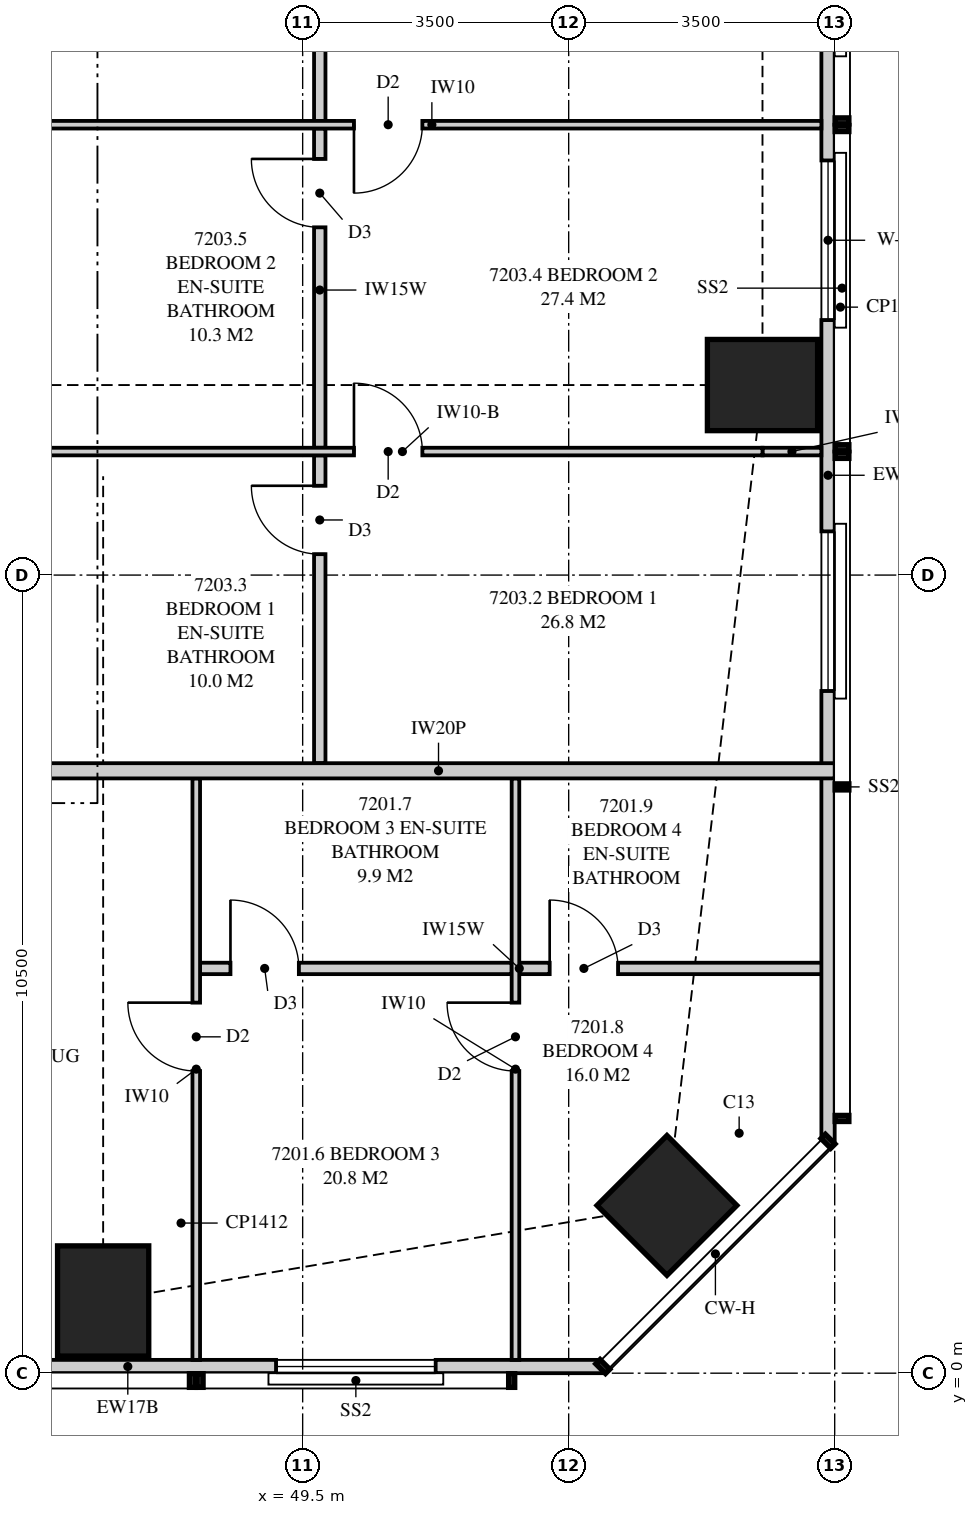
"""IFC4 building model, lengths in metres.
Left out: names, types, materials, properties, quantities, classifications, styles, units other than length and angle.
Written with IfcOpenShell. Run it as: python <this file> out.ifc"""

import sys

from ifc_helpers import new_model, si_unit, direction, frame, frame_2d, origin, origin_2d, place, context, subcontext, project, spatial, polyline, rectangle, outline, extrude, element, fill, save


model = new_model("IFC4")
c1 = context("Model", 3, precision=1e-05, world=origin(), true_north=direction((0.0, 1.0)))
c2 = subcontext(c1, "Body", "Model", "MODEL_VIEW")
j1 = project(units=[si_unit("LENGTHUNIT", "METRE"), si_unit("PLANEANGLEUNIT", "RADIAN")], contexts=[c1])
p1 = place(None, origin())
s1 = spatial("IfcSite", under=j1, at=p1, CompositionType="ELEMENT")
p2 = place(p1, origin())
s2 = spatial("IfcBuilding", under=s1, at=p2, CompositionType="ELEMENT")
p3 = place(p2, frame((0.0, 0.0, 263.85)))
s3 = spatial("IfcBuildingStorey", under=s2, at=p3, CompositionType="ELEMENT", Elevation=263.85)
p4 = place(p3, frame((46.875, 0.95, 0.0), z_axis=(0.0, 0.0, 1.0), x_axis=(0.0, 1.0, 0.0)))
e1 = element("IfcColumn", 1, at=p4, inside=s3, PredefinedType="COLUMN", context=c2, shape_type="SweptSolid", body=[
    extrude(rectangle(XDim=1.45, YDim=1.2, at=origin_2d()), origin(), (0.0, 0.0, 1.0), 3.9),
])
p5 = place(p3, frame((54.293, 2.207, 0.0), z_axis=(0.0, 0.0, 1.0), x_axis=(0.707106781187, 0.707106781187, 0.0)))
e2 = element("IfcColumn", 2, at=p5, inside=s3, PredefinedType="COLUMN", context=c2, shape_type="SweptSolid", body=[
    extrude(rectangle(XDim=1.3, YDim=1.3, at=origin_2d()), origin(), (0.0, 0.0, 1.0), 3.9),
])
p6 = place(p3, frame((55.55, 13.0, 0.0), z_axis=(0.0, 0.0, 1.0), x_axis=(1.0, 0.0, 0.0)))
e3 = element("IfcColumn", 3, at=p6, inside=s3, PredefinedType="COLUMN", context=c2, shape_type="SweptSolid", body=[
    extrude(rectangle(XDim=1.45, YDim=1.2, at=origin_2d()), origin(), (0.0, 0.0, 1.0), 3.9),
])
p7 = place(p3, frame((40.95, 0.087, 0.0), z_axis=(0.0, 0.0, 1.0), x_axis=(1.0, 0.0, 0.0)))
e4 = element("IfcWall", 4, at=p7, inside=s3, PredefinedType="SOLIDWALL", context=c2, shape_type="SweptSolid", body=[
    extrude(outline(polyline([(0.0, 0.0), (12.499, 0.0), (12.499, 3.62), (6.14, 3.62), (6.14, 2.7), (6.056, 2.7), (6.056, 3.62), (5.925, 3.62), (5.925, 2.7), (0.0, 2.7), (0.0, 0.0)])), frame((0.0, 0.087, 0.0), z_axis=(0.0, -1.0, 0.0), x_axis=(1.0, 0.0, 0.0)), (0.0, 0.0, 1.0), 0.175),
])
p8 = place(p7, frame((0.761, 0.0, 0.4)))
e5 = element("IfcOpeningElement", 5, at=p8, cuts=e4, PredefinedType="OPENING", context=c2, shape_type="SweptSolid", body=[
    extrude(rectangle(XDim=1.2, YDim=2.0, at=frame_2d((0.6, 1.0))), frame((0.0, 0.097, 0.0), z_axis=(0.0, -1.0, 0.0), x_axis=(1.0, 0.0, 0.0)), (0.0, 0.0, 1.0), 0.195),
])
p9 = place(p7, frame((2.944, 0.0, 0.4)))
e6 = element("IfcOpeningElement", 6, at=p9, cuts=e4, PredefinedType="OPENING", context=c2, shape_type="SweptSolid", body=[
    extrude(rectangle(XDim=2.1, YDim=2.25, at=frame_2d((1.05, 1.125))), frame((0.0, 0.097, 0.0), z_axis=(0.0, -1.0, 0.0), x_axis=(1.0, 0.0, 0.0)), (0.0, 0.0, 1.0), 0.195),
])
p10 = place(p7, frame((8.2, 0.0, 0.4)))
e7 = element("IfcOpeningElement", 7, at=p10, cuts=e4, PredefinedType="OPENING", context=c2, shape_type="SweptSolid", body=[
    extrude(rectangle(XDim=2.1, YDim=2.25, at=frame_2d((1.05, 1.125))), frame((0.0, 0.097, 0.0), z_axis=(0.0, -1.0, 0.0), x_axis=(1.0, 0.0, 0.0)), (0.0, 0.0, 1.0), 0.195),
])
p11 = place(p3, frame((56.413, 3.051, 0.0), z_axis=(0.0, 0.0, 1.0), x_axis=(0.0, 1.0, 0.0)))
e8 = element("IfcWall", 8, at=p11, inside=s3, PredefinedType="SOLIDWALL", context=c2, shape_type="SweptSolid", body=[
    extrude(outline(polyline([(0.0, 0.0), (17.524, 0.0), (17.524, 2.7), (9.949, 2.7), (9.949, 3.62), (9.858, 3.62), (9.858, 2.7), (9.688, 2.7), (9.688, 3.62), (0.0, 3.62), (0.0, 0.0)])), frame((0.0, 0.087, 0.0), z_axis=(0.0, -1.0, 0.0), x_axis=(1.0, 0.0, 0.0)), (0.0, 0.0, 1.0), 0.175),
])
p12 = place(p11, frame((5.924, 0.0, 0.4)))
e9 = element("IfcOpeningElement", 9, at=p12, cuts=e8, PredefinedType="OPENING", context=c2, shape_type="SweptSolid", body=[
    extrude(rectangle(XDim=2.1, YDim=2.25, at=frame_2d((1.05, 1.125))), frame((0.0, 0.097, 0.0), z_axis=(0.0, -1.0, 0.0), x_axis=(1.0, 0.0, 0.0)), (0.0, 0.0, 1.0), 0.195),
])
p13 = place(p11, frame((10.804, 0.0, 0.4)))
e10 = element("IfcOpeningElement", 10, at=p13, cuts=e8, PredefinedType="OPENING", context=c2, shape_type="SweptSolid", body=[
    extrude(rectangle(XDim=2.1, YDim=2.25, at=frame_2d((1.05, 1.125))), frame((0.0, 0.097, 0.0), z_axis=(0.0, -1.0, 0.0), x_axis=(1.0, 0.0, 0.0)), (0.0, 0.0, 1.0), 0.195),
])
p14 = place(p11, frame((14.374, 0.0, 0.4)))
e11 = element("IfcOpeningElement", 11, at=p14, cuts=e8, PredefinedType="OPENING", context=c2, shape_type="SweptSolid", body=[
    extrude(rectangle(XDim=2.1, YDim=2.25, at=frame_2d((1.05, 1.125))), frame((0.0, 0.097, 0.0), z_axis=(0.0, -1.0, 0.0), x_axis=(1.0, 0.0, 0.0)), (0.0, 0.0, 1.0), 0.195),
])
p15 = place(p3, frame((48.1, 0.175, 0.0), z_axis=(0.0, 0.0, 1.0), x_axis=(0.0, 1.0, 0.0)))
e12 = element("IfcWall", 12, at=p15, inside=s3, PredefinedType="PARTITIONING", context=c2, shape_type="SweptSolid", body=[
    extrude(outline(polyline([(0.0, 0.0), (7.65, 0.0), (7.65, 3.62), (7.65, 3.02), (1.855, 3.02), (1.855, 2.7), (0.11, 2.7), (0.11, 3.62), (0.0, 3.62), (0.0, 0.0)])), frame((0.0, 0.05, 0.0), z_axis=(0.0, -1.0, 0.0), x_axis=(1.0, 0.0, 0.0)), (0.0, 0.0, 1.0), 0.1),
])
p16 = place(p15, frame((3.8, 0.0, 0.0)))
e13 = element("IfcOpeningElement", 13, at=p16, cuts=e12, PredefinedType="OPENING", context=c2, shape_type="SweptSolid", body=[
    extrude(rectangle(XDim=0.9, YDim=2.1, at=frame_2d((0.45, 1.05))), frame((0.0, 0.06, 0.0), z_axis=(0.0, -1.0, 0.0), x_axis=(1.0, 0.0, 0.0)), (0.0, 0.0, 1.0), 0.12),
])
p17 = place(p3, frame((52.3, 0.175, 0.0), z_axis=(0.0, 0.0, 1.0), x_axis=(0.0, 1.0, 0.0)))
e14 = element("IfcWall", 14, at=p17, inside=s3, PredefinedType="PARTITIONING", context=c2, shape_type="SweptSolid", body=[
    extrude(outline(polyline([(0.0, 0.0), (7.65, 0.0), (7.65, 3.62), (2.567, 3.62), (2.567, 2.7), (0.822, 2.7), (0.822, 3.62), (0.0, 3.62), (0.0, 0.0)])), frame((0.0, 0.05, 0.0), z_axis=(0.0, -1.0, 0.0), x_axis=(1.0, 0.0, 0.0)), (0.0, 0.0, 1.0), 0.1),
])
p18 = place(p17, frame((3.8, 0.0, 0.0)))
e15 = element("IfcOpeningElement", 15, at=p18, cuts=e14, PredefinedType="OPENING", context=c2, shape_type="SweptSolid", body=[
    extrude(rectangle(XDim=0.9, YDim=2.1, at=frame_2d((0.45, 1.05))), frame((0.0, 0.06, 0.0), z_axis=(0.0, -1.0, 0.0), x_axis=(1.0, 0.0, 0.0)), (0.0, 0.0, 1.0), 0.12),
])
p19 = place(p3, frame((48.15, 5.325, 0.0), z_axis=(0.0, 0.0, 1.0), x_axis=(1.0, 0.0, 0.0)))
e16 = element("IfcWall", 16, at=p19, inside=s3, PredefinedType="PLUMBINGWALL", context=c2, shape_type="SweptSolid", body=[
    extrude(outline(polyline([(0.0, 0.0), (4.1, 0.0), (4.1, 3.62), (0.01, 3.62), (0.01, 3.02), (0.0, 3.02), (0.0, 3.62), (0.0, 0.0)])), frame((0.0, 0.075, 0.0), z_axis=(0.0, -1.0, 0.0), x_axis=(1.0, 0.0, 0.0)), (0.0, 0.0, 1.0), 0.15),
])
p20 = place(p19, frame((0.4, 0.0, 0.0)))
e17 = element("IfcOpeningElement", 17, at=p20, cuts=e16, PredefinedType="OPENING", context=c2, shape_type="SweptSolid", body=[
    extrude(rectangle(XDim=0.9, YDim=2.1, at=frame_2d((0.45, 1.05))), frame((0.0, 0.085, 0.0), z_axis=(0.0, -1.0, 0.0), x_axis=(1.0, 0.0, 0.0)), (0.0, 0.0, 1.0), 0.17),
])
p21 = place(p3, frame((52.35, 5.325, 0.0), z_axis=(0.0, 0.0, 1.0), x_axis=(1.0, 0.0, 0.0)))
e18 = element("IfcWall", 18, at=p21, inside=s3, PredefinedType="PLUMBINGWALL", context=c2, shape_type="SweptSolid", body=[
    extrude(outline(polyline([(0.0, 0.0), (4.15, 0.0), (4.15, 3.62), (3.197, 3.62), (3.197, 2.7), (1.415, 2.7), (1.415, 3.62), (0.0, 3.62), (0.0, 0.0)])), frame((0.0, 0.075, 0.0), z_axis=(0.0, -1.0, 0.0), x_axis=(1.0, 0.0, 0.0)), (0.0, 0.0, 1.0), 0.15),
])
p22 = place(p21, frame((0.4, 0.0, 0.0)))
e19 = element("IfcOpeningElement", 19, at=p22, cuts=e18, PredefinedType="OPENING", context=c2, shape_type="SweptSolid", body=[
    extrude(rectangle(XDim=0.9, YDim=2.1, at=frame_2d((0.45, 1.05))), frame((0.0, 0.085, 0.0), z_axis=(0.0, -1.0, 0.0), x_axis=(1.0, 0.0, 0.0)), (0.0, 0.0, 1.0), 0.17),
])
p23 = place(p3, frame((46.075, 7.925, 0.0), z_axis=(0.0, 0.0, 1.0), x_axis=(1.0, 0.0, 0.0)))
e20 = element("IfcWall", 20, at=p23, inside=s3, PredefinedType="PARTITIONING", context=c2, shape_type="SweptSolid", body=[
    extrude(outline(polyline([(0.0, 0.0), (10.425, 0.0), (10.425, 3.62), (9.8, 3.62), (9.8, 2.7), (7.968, 2.7), (7.968, 3.62), (2.11, 3.62), (2.11, 3.02), (0.0, 3.02), (0.0, 3.62), (0.0, 0.0)])), frame((0.0, 0.1, 0.0), z_axis=(0.0, -1.0, 0.0), x_axis=(1.0, 0.0, 0.0)), (0.0, 0.0, 1.0), 0.2),
])
p24 = place(p3, frame((56.325, 12.125, 0.0), z_axis=(0.0, 0.0, 1.0), x_axis=(-1.0, 0.0, 0.0)))
e21 = element("IfcWall", 21, at=p24, inside=s3, PredefinedType="PARTITIONING", context=c2, shape_type="SweptSolid", body=[
    extrude(outline(polyline([(0.0, 0.0), (0.775, 0.0), (0.775, 2.7), (0.011, 2.7), (0.011, 3.62), (0.0, 3.62), (0.0, 0.0)])), frame((0.0, 0.05, 0.0), z_axis=(0.0, -1.0, 0.0), x_axis=(1.0, 0.0, 0.0)), (0.0, 0.0, 1.0), 0.1),
])
p25 = place(p3, frame((55.55, 12.125, 0.0), z_axis=(0.0, 0.0, 1.0), x_axis=(-1.0, 0.0, 0.0)))
e22 = element("IfcWall", 22, at=p25, inside=s3, PredefinedType="PARTITIONING", context=c2, shape_type="SweptSolid", body=[
    extrude(outline(polyline([(0.0, 0.0), (9.475, 0.0), (9.475, 3.02), (0.968, 3.02), (0.968, 2.7), (0.0, 2.7), (0.0, 0.0)])), frame((0.0, 0.05, 0.0), z_axis=(0.0, -1.0, 0.0), x_axis=(1.0, 0.0, 0.0)), (0.0, 0.0, 1.0), 0.1),
])
p26 = place(p25, frame((4.475, 0.0, 0.0)))
e23 = element("IfcOpeningElement", 23, at=p26, cuts=e22, PredefinedType="OPENING", context=c2, shape_type="SweptSolid", body=[
    extrude(rectangle(XDim=0.9, YDim=2.1, at=frame_2d((0.45, 1.05))), frame((0.0, 0.06, 0.0), z_axis=(0.0, -1.0, 0.0), x_axis=(1.0, 0.0, 0.0)), (0.0, 0.0, 1.0), 0.12),
])
p27 = place(p3, frame((56.325, 16.425, 0.0), z_axis=(0.0, 0.0, 1.0), x_axis=(-1.0, 0.0, 0.0)))
e24 = element("IfcWall", 24, at=p27, inside=s3, PredefinedType="PARTITIONING", context=c2, shape_type="SweptSolid", body=[
    extrude(outline(polyline([(0.0, 0.0), (10.25, 0.0), (10.25, 3.62), (1.635, 3.62), (1.635, 2.7), (0.0, 2.7), (0.0, 3.62), (0.0, 0.0)])), frame((0.0, 0.05, 0.0), z_axis=(0.0, -1.0, 0.0), x_axis=(1.0, 0.0, 0.0)), (0.0, 0.0, 1.0), 0.1),
])
p28 = place(p27, frame((5.25, 0.0, 0.0)))
e25 = element("IfcOpeningElement", 25, at=p28, cuts=e24, PredefinedType="OPENING", context=c2, shape_type="SweptSolid", body=[
    extrude(rectangle(XDim=0.9, YDim=2.1, at=frame_2d((0.45, 1.05))), frame((0.0, 0.06, 0.0), z_axis=(0.0, -1.0, 0.0), x_axis=(1.0, 0.0, 0.0)), (0.0, 0.0, 1.0), 0.12),
])
p29 = place(p3, frame((49.725, 8.025, 0.0), z_axis=(0.0, 0.0, 1.0), x_axis=(0.0, 1.0, 0.0)))
e26 = element("IfcWall", 26, at=p29, inside=s3, PredefinedType="PLUMBINGWALL", context=c2, shape_type="SweptSolid", body=[
    extrude(outline(polyline([(0.0, 0.0), (4.05, 0.0), (4.05, 3.62), (4.05, 3.02), (3.69, 3.02), (3.69, 3.62), (0.0, 3.62), (0.0, 0.0)])), frame((0.0, 0.075, 0.0), z_axis=(0.0, -1.0, 0.0), x_axis=(1.0, 0.0, 0.0)), (0.0, 0.0, 1.0), 0.15),
])
p30 = place(p29, frame((2.75, 0.0, 0.0)))
e27 = element("IfcOpeningElement", 27, at=p30, cuts=e26, PredefinedType="OPENING", context=c2, shape_type="SweptSolid", body=[
    extrude(rectangle(XDim=0.9, YDim=2.1, at=frame_2d((0.45, 1.05))), frame((0.0, 0.085, 0.0), z_axis=(0.0, -1.0, 0.0), x_axis=(1.0, 0.0, 0.0)), (0.0, 0.0, 1.0), 0.17),
])
p31 = place(p3, frame((49.725, 12.175, 0.0), z_axis=(0.0, 0.0, 1.0), x_axis=(0.0, 1.0, 0.0)))
e28 = element("IfcWall", 28, at=p31, inside=s3, PredefinedType="PLUMBINGWALL", context=c2, shape_type="SweptSolid", body=[
    extrude(outline(polyline([(0.0, 0.0), (4.2, 0.0), (4.2, 3.62), (2.11, 3.62), (2.11, 3.02), (0.0, 3.02), (0.0, 3.62), (0.0, 0.0)])), frame((0.0, 0.075, 0.0), z_axis=(0.0, -1.0, 0.0), x_axis=(1.0, 0.0, 0.0)), (0.0, 0.0, 1.0), 0.15),
])
p32 = place(p31, frame((2.9, 0.0, 0.0)))
e29 = element("IfcOpeningElement", 29, at=p32, cuts=e28, PredefinedType="OPENING", context=c2, shape_type="SweptSolid", body=[
    extrude(rectangle(XDim=0.9, YDim=2.1, at=frame_2d((0.45, 1.05))), frame((0.0, 0.085, 0.0), z_axis=(0.0, -1.0, 0.0), x_axis=(1.0, 0.0, 0.0)), (0.0, 0.0, 1.0), 0.17),
])
p33 = place(p3, frame((49.725, 16.475, 0.0), z_axis=(0.0, 0.0, 1.0), x_axis=(0.0, 1.0, 0.0)))
e30 = element("IfcWall", 30, at=p33, inside=s3, PredefinedType="PLUMBINGWALL", context=c2, shape_type="SweptSolid", body=[
    extrude(outline(polyline([(0.0, 0.0), (4.0, 0.0), (4.0, 3.62), (3.56, 3.62), (3.56, 3.02), (0.99, 3.02), (0.99, 3.62), (0.0, 3.62), (0.0, 0.0)])), frame((0.0, 0.075, 0.0), z_axis=(0.0, -1.0, 0.0), x_axis=(1.0, 0.0, 0.0)), (0.0, 0.0, 1.0), 0.15),
])
p34 = place(p10, origin())
e31 = element("IfcWindow", 31, at=p34, inside=s3, PartitioningType="SINGLE_PANEL", PredefinedType="WINDOW", context=c2, shape_type="SweptSolid", body=[
    extrude(rectangle(XDim=2.1, YDim=2.25, at=frame_2d((1.05, 1.125))), frame((0.0, 0.03, 0.0), z_axis=(0.0, -1.0, 0.0), x_axis=(1.0, 0.0, 0.0)), (0.0, 0.0, 1.0), 0.06),
])
fill(e7, e31)
p35 = place(p12, origin())
e32 = element("IfcWindow", 32, at=p35, inside=s3, PartitioningType="SINGLE_PANEL", PredefinedType="WINDOW", context=c2, shape_type="SweptSolid", body=[
    extrude(rectangle(XDim=2.1, YDim=2.25, at=frame_2d((1.05, 1.125))), frame((0.0, 0.03, 0.0), z_axis=(0.0, -1.0, 0.0), x_axis=(1.0, 0.0, 0.0)), (0.0, 0.0, 1.0), 0.06),
])
fill(e9, e32)
p36 = place(p13, origin())
e33 = element("IfcWindow", 33, at=p36, inside=s3, PartitioningType="SINGLE_PANEL", PredefinedType="WINDOW", context=c2, shape_type="SweptSolid", body=[
    extrude(rectangle(XDim=2.1, YDim=2.25, at=frame_2d((1.05, 1.125))), frame((0.0, 0.03, 0.0), z_axis=(0.0, -1.0, 0.0), x_axis=(1.0, 0.0, 0.0)), (0.0, 0.0, 1.0), 0.06),
])
fill(e10, e33)
p37 = place(p16, origin())
e34 = element("IfcDoor", 34, at=p37, inside=s3, OperationType="SINGLE_SWING_RIGHT", PredefinedType="DOOR", context=c2, shape_type="SweptSolid", body=[
    extrude(rectangle(XDim=0.9, YDim=2.1, at=frame_2d((0.45, 1.05))), frame((0.0, 0.025, 0.0), z_axis=(0.0, -1.0, 0.0), x_axis=(1.0, 0.0, 0.0)), (0.0, 0.0, 1.0), 0.05),
])
fill(e13, e34)
p38 = place(p20, origin())
e35 = element("IfcDoor", 35, at=p38, inside=s3, OperationType="SINGLE_SWING_LEFT", PredefinedType="DOOR", context=c2, shape_type="SweptSolid", body=[
    extrude(rectangle(XDim=0.9, YDim=2.1, at=frame_2d((0.45, 1.05))), frame((0.0, 0.025, 0.0), z_axis=(0.0, -1.0, 0.0), x_axis=(1.0, 0.0, 0.0)), (0.0, 0.0, 1.0), 0.05),
])
fill(e17, e35)
p39 = place(p18, origin())
e36 = element("IfcDoor", 36, at=p39, inside=s3, OperationType="SINGLE_SWING_RIGHT", PredefinedType="DOOR", context=c2, shape_type="SweptSolid", body=[
    extrude(rectangle(XDim=0.9, YDim=2.1, at=frame_2d((0.45, 1.05))), frame((0.0, 0.025, 0.0), z_axis=(0.0, -1.0, 0.0), x_axis=(1.0, 0.0, 0.0)), (0.0, 0.0, 1.0), 0.05),
])
fill(e15, e36)
p40 = place(p22, origin())
e37 = element("IfcDoor", 37, at=p40, inside=s3, OperationType="SINGLE_SWING_LEFT", PredefinedType="DOOR", context=c2, shape_type="SweptSolid", body=[
    extrude(rectangle(XDim=0.9, YDim=2.1, at=frame_2d((0.45, 1.05))), frame((0.0, 0.025, 0.0), z_axis=(0.0, -1.0, 0.0), x_axis=(1.0, 0.0, 0.0)), (0.0, 0.0, 1.0), 0.05),
])
fill(e19, e37)
p41 = place(p26, frame((0.9, 0.0, 0.0), z_axis=(0.0, 0.0, 1.0), x_axis=(-1.0, 0.0, 0.0)))
e38 = element("IfcDoor", 38, at=p41, inside=s3, OperationType="SINGLE_SWING_LEFT", PredefinedType="DOOR", context=c2, shape_type="SweptSolid", body=[
    extrude(rectangle(XDim=0.9, YDim=2.1, at=frame_2d((0.45, 1.05))), frame((0.0, 0.025, 0.0), z_axis=(0.0, -1.0, 0.0), x_axis=(1.0, 0.0, 0.0)), (0.0, 0.0, 1.0), 0.05),
])
fill(e23, e38)
p42 = place(p30, origin())
e39 = element("IfcDoor", 39, at=p42, inside=s3, OperationType="SINGLE_SWING_RIGHT", PredefinedType="DOOR", context=c2, shape_type="SweptSolid", body=[
    extrude(rectangle(XDim=0.9, YDim=2.1, at=frame_2d((0.45, 1.05))), frame((0.0, 0.025, 0.0), z_axis=(0.0, -1.0, 0.0), x_axis=(1.0, 0.0, 0.0)), (0.0, 0.0, 1.0), 0.05),
])
fill(e27, e39)
p43 = place(p28, origin())
e40 = element("IfcDoor", 40, at=p43, inside=s3, OperationType="SINGLE_SWING_RIGHT", PredefinedType="DOOR", context=c2, shape_type="SweptSolid", body=[
    extrude(rectangle(XDim=0.9, YDim=2.1, at=frame_2d((0.45, 1.05))), frame((0.0, 0.025, 0.0), z_axis=(0.0, -1.0, 0.0), x_axis=(1.0, 0.0, 0.0)), (0.0, 0.0, 1.0), 0.05),
])
fill(e25, e40)
p44 = place(p32, origin())
e41 = element("IfcDoor", 41, at=p44, inside=s3, OperationType="SINGLE_SWING_RIGHT", PredefinedType="DOOR", context=c2, shape_type="SweptSolid", body=[
    extrude(rectangle(XDim=0.9, YDim=2.1, at=frame_2d((0.45, 1.05))), frame((0.0, 0.025, 0.0), z_axis=(0.0, -1.0, 0.0), x_axis=(1.0, 0.0, 0.0)), (0.0, 0.0, 1.0), 0.05),
])
fill(e29, e41)
save(model, sys.argv[1])
